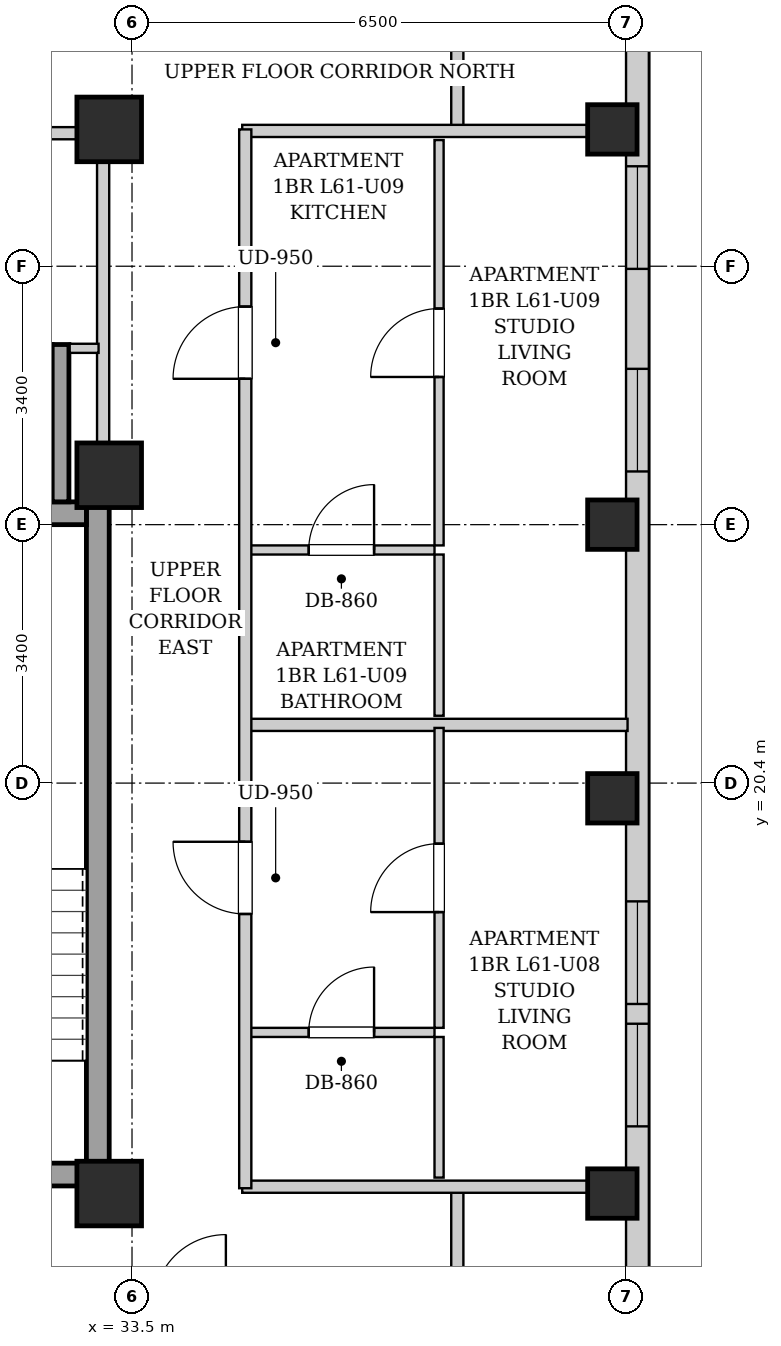
"""IFC4 building model, lengths in metres.
Left out: names, types, materials, properties, quantities, classifications, styles, units other than length and angle.
Written with IfcOpenShell. Run it as: python <this file> out.ifc"""

import sys

from ifc_helpers import new_model, si_unit, direction, frame, frame_2d, origin, origin_2d, place, context, subcontext, project, spatial, rectangle, extrude, element, fill, save


model = new_model("IFC4")
c1 = context("Model", 3, precision=1e-05, world=origin(), true_north=direction((0.0, 1.0)))
c2 = subcontext(c1, "Body", "Model", "MODEL_VIEW")
j1 = project(units=[si_unit("LENGTHUNIT", "METRE"), si_unit("PLANEANGLEUNIT", "RADIAN")], contexts=[c1])
p1 = place(None, origin())
s1 = spatial("IfcSite", under=j1, at=p1, CompositionType="ELEMENT")
p2 = place(p1, origin())
s2 = spatial("IfcBuilding", under=s1, at=p2, CompositionType="ELEMENT")
p3 = place(p2, frame((0.0, 0.0, 210.7)))
s3 = spatial("IfcBuildingStorey", under=s2, at=p3, CompositionType="ELEMENT", Elevation=210.7)
for number, where, z_axis, x_axis in (
    (1, (39.82, 15.0, 0.0), (0.0, 0.0, 1.0), (1.0, 0.0, 0.0)),
    (2, (39.82, 20.2, 0.0), (0.0, 0.0, 1.0), (1.0, 0.0, 0.0)),
    (3, (39.82, 23.8, 0.0), (0.0, 0.0, 1.0), (1.0, 0.0, 0.0)),
    (4, (39.82, 29.0, 0.0), (0.0, 0.0, 1.0), (1.0, 0.0, 0.0)),
):
    element("IfcColumn", number, at=place(p3, frame(where, z_axis=z_axis, x_axis=x_axis)), inside=s3, PredefinedType="COLUMN", context=c2, shape_type="SweptSolid", body=[
        extrude(rectangle(XDim=0.65, YDim=0.65, at=origin_2d()), origin(), (0.0, 0.0, 1.0), 3.3),
    ])
for number, where, z_axis, x_axis in (
    (5, (33.2, 15.0, 0.0), (0.0, 0.0, 1.0), (1.0, 0.0, 0.0)),
    (6, (33.2, 29.0, 0.0), (0.0, 0.0, 1.0), (1.0, 0.0, 0.0)),
    (7, (33.2, 24.45, 0.0), (0.0, 0.0, 1.0), (1.0, 0.0, 0.0)),
):
    element("IfcColumn", number, at=place(p3, frame(where, z_axis=z_axis, x_axis=x_axis)), inside=s3, PredefinedType="COLUMN", context=c2, shape_type="SweptSolid", body=[
        extrude(rectangle(XDim=0.85, YDim=0.85, at=origin_2d()), origin(), (0.0, 0.0, 1.0), 3.3),
    ])
p4 = place(p3, frame((40.15, 37.7, 0.0), z_axis=(0.0, 0.0, 1.0), x_axis=(0.0, -1.0, 0.0)))
e8 = element("IfcWall", 8, at=p4, inside=s3, PredefinedType="SOLIDWALL", context=c2, shape_type="SweptSolid", body=[
    extrude(rectangle(XDim=31.4, YDim=0.3, at=frame_2d((15.7, 0.0))), origin(), (0.0, 0.0, 1.0), 3.04),
])
p5 = place(p4, frame((28.396, 0.0, 0.55)))
e9 = element("IfcOpeningElement", 9, at=p5, cuts=e8, PredefinedType="OPENING", context=c2, shape_type="SweptSolid", body=[
    extrude(rectangle(XDim=1.35, YDim=1.2, at=frame_2d((0.675, 0.6))), frame((0.0, 0.16, 0.0), z_axis=(0.0, -1.0, 0.0), x_axis=(1.0, 0.0, 0.0)), (0.0, 0.0, 1.0), 0.32),
])
p6 = place(p4, frame((1.653, 0.0, 0.55)))
e10 = element("IfcOpeningElement", 10, at=p6, cuts=e8, PredefinedType="OPENING", context=c2, shape_type="SweptSolid", body=[
    extrude(rectangle(XDim=1.35, YDim=1.2, at=frame_2d((0.675, 0.6))), frame((0.0, 0.16, 0.0), z_axis=(0.0, -1.0, 0.0), x_axis=(1.0, 0.0, 0.0)), (0.0, 0.0, 1.0), 0.32),
])
p7 = place(p4, frame((18.856, 0.0, 0.55)))
e11 = element("IfcOpeningElement", 11, at=p7, cuts=e8, PredefinedType="OPENING", context=c2, shape_type="SweptSolid", body=[
    extrude(rectangle(XDim=1.35, YDim=1.2, at=frame_2d((0.675, 0.6))), frame((0.0, 0.16, 0.0), z_axis=(0.0, -1.0, 0.0), x_axis=(1.0, 0.0, 0.0)), (0.0, 0.0, 1.0), 0.32),
])
p8 = place(p4, frame((20.466, 0.0, 0.55)))
e12 = element("IfcOpeningElement", 12, at=p8, cuts=e8, PredefinedType="OPENING", context=c2, shape_type="SweptSolid", body=[
    extrude(rectangle(XDim=1.35, YDim=1.2, at=frame_2d((0.675, 0.6))), frame((0.0, 0.16, 0.0), z_axis=(0.0, -1.0, 0.0), x_axis=(1.0, 0.0, 0.0)), (0.0, 0.0, 1.0), 0.32),
])
p9 = place(p4, frame((11.85, 0.0, 0.55)))
e13 = element("IfcOpeningElement", 13, at=p9, cuts=e8, PredefinedType="OPENING", context=c2, shape_type="SweptSolid", body=[
    extrude(rectangle(XDim=1.35, YDim=1.2, at=frame_2d((0.675, 0.6))), frame((0.0, 0.16, 0.0), z_axis=(0.0, -1.0, 0.0), x_axis=(1.0, 0.0, 0.0)), (0.0, 0.0, 1.0), 0.32),
])
p10 = place(p4, frame((9.185, 0.0, 0.55)))
e14 = element("IfcOpeningElement", 14, at=p10, cuts=e8, PredefinedType="OPENING", context=c2, shape_type="SweptSolid", body=[
    extrude(rectangle(XDim=1.35, YDim=1.2, at=frame_2d((0.675, 0.6))), frame((0.0, 0.16, 0.0), z_axis=(0.0, -1.0, 0.0), x_axis=(1.0, 0.0, 0.0)), (0.0, 0.0, 1.0), 0.32),
])
p11 = place(p3, frame((33.05, 15.1, 0.0), z_axis=(0.0, 0.0, 1.0), x_axis=(0.0, 1.0, 0.0)))
e15 = element("IfcWall", 15, at=p11, inside=s3, PredefinedType="SHEAR", context=c2, shape_type="SweptSolid", body=[
    extrude(rectangle(XDim=9.0, YDim=0.3, at=frame_2d((4.5, 0.0))), origin(), (0.0, 0.0, 1.0), 3.04),
])
p12 = place(p3, frame((30.05, 23.95, 0.0), z_axis=(0.0, 0.0, 1.0), x_axis=(1.0, 0.0, 0.0)))
e16 = element("IfcWall", 16, at=p12, inside=s3, PredefinedType="SHEAR", context=c2, shape_type="SweptSolid", body=[
    extrude(rectangle(XDim=2.85, YDim=0.3, at=frame_2d((1.425, 0.0))), origin(), (0.0, 0.0, 1.0), 3.04),
])
p13 = place(p3, frame((30.05, 15.25, 0.0), z_axis=(0.0, 0.0, 1.0), x_axis=(1.0, 0.0, 0.0)))
e17 = element("IfcWall", 17, at=p13, inside=s3, PredefinedType="SHEAR", context=c2, shape_type="SweptSolid", body=[
    extrude(rectangle(XDim=2.85, YDim=0.3, at=frame_2d((1.425, 0.0))), origin(), (0.0, 0.0, 1.0), 3.04),
])
p14 = place(p13, frame((0.86, 0.0, 0.0)))
e18 = element("IfcOpeningElement", 18, at=p14, cuts=e17, PredefinedType="OPENING", context=c2, shape_type="SweptSolid", body=[
    extrude(rectangle(XDim=1.1, YDim=2.05, at=frame_2d((0.55, 1.025))), frame((0.0, 0.16, 0.0), z_axis=(0.0, -1.0, 0.0), x_axis=(1.0, 0.0, 0.0)), (0.0, 0.0, 1.0), 0.32),
])
p15 = place(p3, frame((32.56, 24.1, 0.0), z_axis=(0.0, 0.0, 1.0), x_axis=(0.0, 1.0, 0.0)))
e19 = element("IfcWall", 19, at=p15, inside=s3, PredefinedType="SHEAR", context=c2, shape_type="SweptSolid", body=[
    extrude(rectangle(XDim=2.07, YDim=0.22, at=frame_2d((1.035, 0.0))), origin(), (0.0, 0.0, 1.0), 3.04),
])
p16 = place(p3, frame((33.12, 24.12, 0.0), z_axis=(0.0, 0.0, 1.0), x_axis=(0.0, 1.0, 0.0)))
e20 = element("IfcWall", 20, at=p16, inside=s3, PredefinedType="PARTITIONING", context=c2, shape_type="SweptSolid", body=[
    extrude(rectangle(XDim=4.76, YDim=0.16, at=frame_2d((2.38, 0.0))), origin(), (0.0, 0.0, 1.0), 3.04),
])
p17 = place(p3, frame((32.68, 26.12, 0.0), z_axis=(0.0, 0.0, 1.0), x_axis=(1.0, 0.0, 0.0)))
e21 = element("IfcWall", 21, at=p17, inside=s3, PredefinedType="PARTITIONING", context=c2, shape_type="SweptSolid", body=[
    extrude(rectangle(XDim=0.38, YDim=0.12, at=frame_2d((0.19, 0.0))), origin(), (0.0, 0.0, 1.0), 3.04),
])
p18 = place(p3, frame((30.08, 28.95, 0.0), z_axis=(0.0, 0.0, 1.0), x_axis=(1.0, 0.0, 0.0)))
e22 = element("IfcWall", 22, at=p18, inside=s3, PredefinedType="PARTITIONING", context=c2, shape_type="SweptSolid", body=[
    extrude(rectangle(XDim=2.96, YDim=0.16, at=frame_2d((1.48, 0.0))), origin(), (0.0, 0.0, 1.0), 3.04),
])
p19 = place(p18, frame((0.695, 0.0, 0.0)))
e23 = element("IfcOpeningElement", 23, at=p19, cuts=e22, PredefinedType="OPENING", context=c2, shape_type="SweptSolid", body=[
    extrude(rectangle(XDim=0.86, YDim=2.05, at=frame_2d((0.43, 1.025))), frame((0.0, 0.09, 0.0), z_axis=(0.0, -1.0, 0.0), x_axis=(1.0, 0.0, 0.0)), (0.0, 0.0, 1.0), 0.18),
])
for number, where, z_axis, x_axis in (
    (24, (37.78, 13.51, 0.0), (0.0, 0.0, 1.0), (0.0, 1.0, 0.0)),
    (25, (37.78, 28.98, 0.0), (0.0, 0.0, 1.0), (0.0, 1.0, 0.0)),
):
    element("IfcWall", number, at=place(p3, frame(where, z_axis=z_axis, x_axis=x_axis)), inside=s3, PredefinedType="PARTITIONING", context=c2, shape_type="SweptSolid", body=[
        extrude(rectangle(XDim=1.58, YDim=0.16, at=frame_2d((0.79, 0.0))), origin(), (0.0, 0.0, 1.0), 3.04),
    ])
for number, where, z_axis, x_axis in (
    (26, (34.95, 15.09, 0.0), (0.0, 0.0, 1.0), (1.0, 0.0, 0.0)),
    (27, (34.95, 28.98, 0.0), (0.0, 0.0, 1.0), (1.0, 0.0, 0.0)),
):
    element("IfcWall", number, at=place(p3, frame(where, z_axis=z_axis, x_axis=x_axis)), inside=s3, PredefinedType="PARTITIONING", context=c2, shape_type="SweptSolid", body=[
        extrude(rectangle(XDim=5.07, YDim=0.16, at=frame_2d((2.535, 0.0))), origin(), (0.0, 0.0, 1.0), 2.556),
    ])
p20 = place(p3, frame((35.03, 21.166, 0.0), z_axis=(0.0, 0.0, 1.0), x_axis=(1.0, 0.0, 0.0)))
e28 = element("IfcWall", 28, at=p20, inside=s3, PredefinedType="PARTITIONING", context=c2, shape_type="SweptSolid", body=[
    extrude(rectangle(XDim=4.99, YDim=0.16, at=frame_2d((2.495, 0.0))), origin(), (0.0, 0.0, 1.0), 3.04),
])
p21 = place(p3, frame((35.03, 17.12, 0.0), z_axis=(0.0, 0.0, 1.0), x_axis=(1.0, 0.0, 0.0)))
e29 = element("IfcWall", 29, at=p21, inside=s3, PredefinedType="PARTITIONING", context=c2, shape_type="SweptSolid", body=[
    extrude(rectangle(XDim=2.45, YDim=0.12, at=frame_2d((1.225, 0.0))), origin(), (0.0, 0.0, 1.0), 3.04),
])
p22 = place(p21, frame((0.795, 0.0, 0.0)))
e30 = element("IfcOpeningElement", 30, at=p22, cuts=e29, PredefinedType="OPENING", context=c2, shape_type="SweptSolid", body=[
    extrude(rectangle(XDim=0.86, YDim=2.05, at=frame_2d((0.43, 1.025))), frame((0.0, 0.07, 0.0), z_axis=(0.0, -1.0, 0.0), x_axis=(1.0, 0.0, 0.0)), (0.0, 0.0, 1.0), 0.14),
])
p23 = place(p3, frame((37.54, 15.21, 0.0), z_axis=(0.0, 0.0, 1.0), x_axis=(0.0, 1.0, 0.0)))
e31 = element("IfcWall", 31, at=p23, inside=s3, PredefinedType="PARTITIONING", context=c2, shape_type="SweptSolid", body=[
    extrude(rectangle(XDim=1.85, YDim=0.12, at=frame_2d((0.925, 0.0))), origin(), (0.0, 0.0, 1.0), 3.04),
])
p24 = place(p3, frame((37.54, 17.18, 0.0), z_axis=(0.0, 0.0, 1.0), x_axis=(0.0, 1.0, 0.0)))
e32 = element("IfcWall", 32, at=p24, inside=s3, PredefinedType="PARTITIONING", context=c2, shape_type="SweptSolid", body=[
    extrude(rectangle(XDim=3.946, YDim=0.12, at=frame_2d((1.973, 0.0))), origin(), (0.0, 0.0, 1.0), 3.04),
])
p25 = place(p24, frame((1.523, 0.0, 0.0)))
e33 = element("IfcOpeningElement", 33, at=p25, cuts=e32, PredefinedType="OPENING", context=c2, shape_type="SweptSolid", body=[
    extrude(rectangle(XDim=0.9, YDim=2.05, at=frame_2d((0.45, 1.025))), frame((0.0, 0.07, 0.0), z_axis=(0.0, -1.0, 0.0), x_axis=(1.0, 0.0, 0.0)), (0.0, 0.0, 1.0), 0.14),
])
p26 = place(p3, frame((35.03, 23.467, 0.0), z_axis=(0.0, 0.0, 1.0), x_axis=(1.0, 0.0, 0.0)))
e34 = element("IfcWall", 34, at=p26, inside=s3, PredefinedType="PARTITIONING", context=c2, shape_type="SweptSolid", body=[
    extrude(rectangle(XDim=2.45, YDim=0.12, at=frame_2d((1.225, 0.0))), origin(), (0.0, 0.0, 1.0), 3.04),
])
p27 = place(p26, frame((0.795, 0.0, 0.0)))
e35 = element("IfcOpeningElement", 35, at=p27, cuts=e34, PredefinedType="OPENING", context=c2, shape_type="SweptSolid", body=[
    extrude(rectangle(XDim=0.86, YDim=2.05, at=frame_2d((0.43, 1.025))), frame((0.0, 0.07, 0.0), z_axis=(0.0, -1.0, 0.0), x_axis=(1.0, 0.0, 0.0)), (0.0, 0.0, 1.0), 0.14),
])
p28 = place(p3, frame((37.54, 21.286, 0.0), z_axis=(0.0, 0.0, 1.0), x_axis=(0.0, 1.0, 0.0)))
e36 = element("IfcWall", 36, at=p28, inside=s3, PredefinedType="PARTITIONING", context=c2, shape_type="SweptSolid", body=[
    extrude(rectangle(XDim=2.121, YDim=0.12, at=frame_2d((1.061, 0.0))), origin(), (0.0, 0.0, 1.0), 3.04),
])
p29 = place(p3, frame((37.54, 23.527, 0.0), z_axis=(0.0, 0.0, 1.0), x_axis=(0.0, 1.0, 0.0)))
e37 = element("IfcWall", 37, at=p29, inside=s3, PredefinedType="PARTITIONING", context=c2, shape_type="SweptSolid", body=[
    extrude(rectangle(XDim=5.333, YDim=0.12, at=frame_2d((2.667, 0.0))), origin(), (0.0, 0.0, 1.0), 3.04),
])
p30 = place(p29, frame((2.216, 0.0, 0.0)))
e38 = element("IfcOpeningElement", 38, at=p30, cuts=e37, PredefinedType="OPENING", context=c2, shape_type="SweptSolid", body=[
    extrude(rectangle(XDim=0.9, YDim=2.05, at=frame_2d((0.45, 1.025))), frame((0.0, 0.07, 0.0), z_axis=(0.0, -1.0, 0.0), x_axis=(1.0, 0.0, 0.0)), (0.0, 0.0, 1.0), 0.14),
])
p31 = place(p3, frame((34.99, 15.07, 0.0), z_axis=(0.0, 0.0, 1.0), x_axis=(0.0, 1.0, 0.0)))
e39 = element("IfcWall", 39, at=p31, inside=s3, PredefinedType="PARTITIONING", context=c2, shape_type="SweptSolid", body=[
    extrude(rectangle(XDim=13.93, YDim=0.16, at=frame_2d((6.965, 0.0))), origin(), (0.0, 0.0, 1.0), 3.04),
])
p32 = place(p31, frame((3.608, 0.0, 0.0)))
e40 = element("IfcOpeningElement", 40, at=p32, cuts=e39, PredefinedType="OPENING", context=c2, shape_type="SweptSolid", body=[
    extrude(rectangle(XDim=0.95, YDim=2.1, at=frame_2d((0.475, 1.05))), frame((0.0, 0.09, 0.0), z_axis=(0.0, -1.0, 0.0), x_axis=(1.0, 0.0, 0.0)), (0.0, 0.0, 1.0), 0.18),
])
p33 = place(p31, frame((10.649, 0.0, 0.0)))
e41 = element("IfcOpeningElement", 41, at=p33, cuts=e39, PredefinedType="OPENING", context=c2, shape_type="SweptSolid", body=[
    extrude(rectangle(XDim=0.95, YDim=2.1, at=frame_2d((0.475, 1.05))), frame((0.0, 0.09, 0.0), z_axis=(0.0, -1.0, 0.0), x_axis=(1.0, 0.0, 0.0)), (0.0, 0.0, 1.0), 0.18),
])
p34 = place(p22, origin())
e42 = element("IfcDoor", 42, at=p34, inside=s3, OperationType="SINGLE_SWING_RIGHT", PredefinedType="DOOR", context=c2, shape_type="SweptSolid", body=[
    extrude(rectangle(XDim=0.86, YDim=2.05, at=frame_2d((0.43, 1.025))), frame((0.0, 0.025, 0.0), z_axis=(0.0, -1.0, 0.0), x_axis=(1.0, 0.0, 0.0)), (0.0, 0.0, 1.0), 0.05),
])
fill(e30, e42)
p35 = place(p25, origin())
e43 = element("IfcDoor", 43, at=p35, inside=s3, OperationType="SINGLE_SWING_LEFT", PredefinedType="DOOR", context=c2, shape_type="SweptSolid", body=[
    extrude(rectangle(XDim=0.9, YDim=2.05, at=frame_2d((0.45, 1.025))), frame((0.0, 0.025, 0.0), z_axis=(0.0, -1.0, 0.0), x_axis=(1.0, 0.0, 0.0)), (0.0, 0.0, 1.0), 0.05),
])
fill(e33, e43)
p36 = place(p27, origin())
e44 = element("IfcDoor", 44, at=p36, inside=s3, OperationType="SINGLE_SWING_RIGHT", PredefinedType="DOOR", context=c2, shape_type="SweptSolid", body=[
    extrude(rectangle(XDim=0.86, YDim=2.05, at=frame_2d((0.43, 1.025))), frame((0.0, 0.025, 0.0), z_axis=(0.0, -1.0, 0.0), x_axis=(1.0, 0.0, 0.0)), (0.0, 0.0, 1.0), 0.05),
])
fill(e35, e44)
p37 = place(p30, origin())
e45 = element("IfcDoor", 45, at=p37, inside=s3, OperationType="SINGLE_SWING_LEFT", PredefinedType="DOOR", context=c2, shape_type="SweptSolid", body=[
    extrude(rectangle(XDim=0.9, YDim=2.05, at=frame_2d((0.45, 1.025))), frame((0.0, 0.025, 0.0), z_axis=(0.0, -1.0, 0.0), x_axis=(1.0, 0.0, 0.0)), (0.0, 0.0, 1.0), 0.05),
])
fill(e38, e45)
p38 = place(p32, origin())
e46 = element("IfcDoor", 46, at=p38, inside=s3, OperationType="SINGLE_SWING_RIGHT", PredefinedType="DOOR", context=c2, shape_type="SweptSolid", body=[
    extrude(rectangle(XDim=0.95, YDim=2.1, at=frame_2d((0.475, 1.05))), frame((0.0, 0.025, 0.0), z_axis=(0.0, -1.0, 0.0), x_axis=(1.0, 0.0, 0.0)), (0.0, 0.0, 1.0), 0.05),
])
fill(e40, e46)
p39 = place(p33, origin())
e47 = element("IfcDoor", 47, at=p39, inside=s3, OperationType="SINGLE_SWING_LEFT", PredefinedType="DOOR", context=c2, shape_type="SweptSolid", body=[
    extrude(rectangle(XDim=0.95, YDim=2.1, at=frame_2d((0.475, 1.05))), frame((0.0, 0.025, 0.0), z_axis=(0.0, -1.0, 0.0), x_axis=(1.0, 0.0, 0.0)), (0.0, 0.0, 1.0), 0.05),
])
fill(e41, e47)
p40 = place(p7, origin())
e48 = element("IfcWindow", 48, at=p40, inside=s3, PartitioningType="SINGLE_PANEL", PredefinedType="WINDOW", context=c2, shape_type="SweptSolid", body=[
    extrude(rectangle(XDim=1.35, YDim=1.2, at=frame_2d((0.675, 0.6))), frame((0.0, 0.03, 0.0), z_axis=(0.0, -1.0, 0.0), x_axis=(1.0, 0.0, 0.0)), (0.0, 0.0, 1.0), 0.06),
])
fill(e11, e48)
p41 = place(p8, origin())
e49 = element("IfcWindow", 49, at=p41, inside=s3, PartitioningType="SINGLE_PANEL", PredefinedType="WINDOW", context=c2, shape_type="SweptSolid", body=[
    extrude(rectangle(XDim=1.35, YDim=1.2, at=frame_2d((0.675, 0.6))), frame((0.0, 0.03, 0.0), z_axis=(0.0, -1.0, 0.0), x_axis=(1.0, 0.0, 0.0)), (0.0, 0.0, 1.0), 0.06),
])
fill(e12, e49)
p42 = place(p9, origin())
e50 = element("IfcWindow", 50, at=p42, inside=s3, PartitioningType="SINGLE_PANEL", PredefinedType="WINDOW", context=c2, shape_type="SweptSolid", body=[
    extrude(rectangle(XDim=1.35, YDim=1.2, at=frame_2d((0.675, 0.6))), frame((0.0, 0.03, 0.0), z_axis=(0.0, -1.0, 0.0), x_axis=(1.0, 0.0, 0.0)), (0.0, 0.0, 1.0), 0.06),
])
fill(e13, e50)
p43 = place(p10, origin())
e51 = element("IfcWindow", 51, at=p43, inside=s3, PartitioningType="SINGLE_PANEL", PredefinedType="WINDOW", context=c2, shape_type="SweptSolid", body=[
    extrude(rectangle(XDim=1.35, YDim=1.2, at=frame_2d((0.675, 0.6))), frame((0.0, 0.03, 0.0), z_axis=(0.0, -1.0, 0.0), x_axis=(1.0, 0.0, 0.0)), (0.0, 0.0, 1.0), 0.06),
])
fill(e14, e51)
save(model, sys.argv[1])
